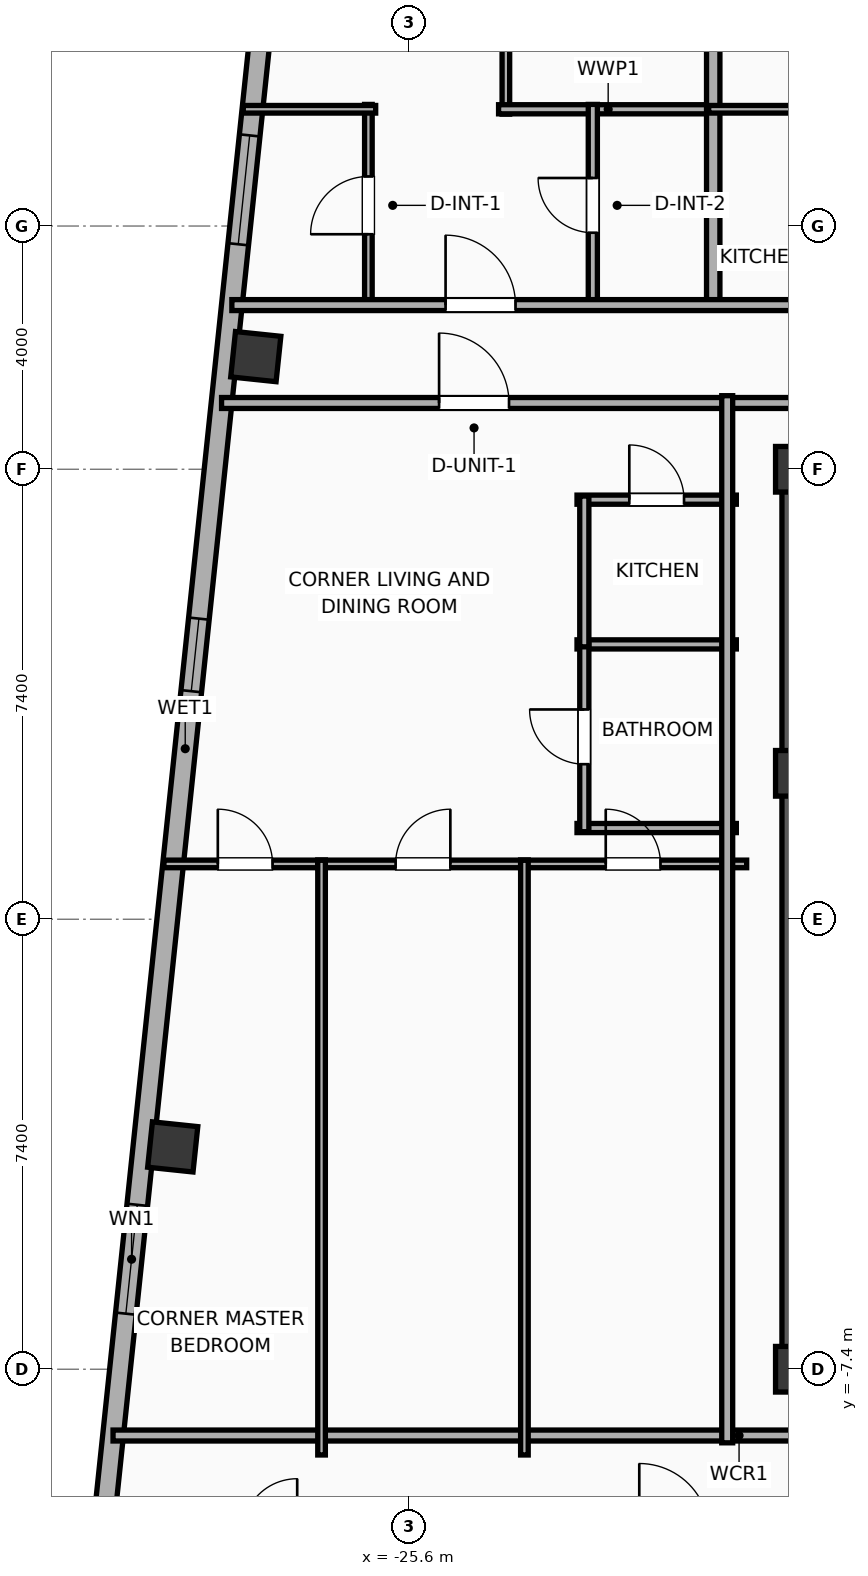
"""IFC4 building model, lengths in metres.
Left out: names, types, materials, properties, quantities, classifications, styles, units other than length and angle.
Written with IfcOpenShell. Run it as: python <this file> out.ifc"""

import sys

from ifc_helpers import new_model, si_unit, direction, frame, frame_2d, origin, origin_2d, place, context, subcontext, project, spatial, rectangle, hollow_rectangle, extrude, element, fill, save


model = new_model("IFC4")
c1 = context("Model", 3, precision=1e-05, world=origin(), true_north=direction((0.0, 1.0)))
c2 = subcontext(c1, "Body", "Model", "MODEL_VIEW")
j1 = project(units=[si_unit("LENGTHUNIT", "METRE"), si_unit("PLANEANGLEUNIT", "RADIAN")], contexts=[c1])
p1 = place(None, origin())
s1 = spatial("IfcSite", under=j1, at=p1, CompositionType="ELEMENT")
p2 = place(p1, origin())
s2 = spatial("IfcBuilding", under=s1, at=p2, CompositionType="ELEMENT")
p3 = place(p2, frame((0.0, 0.0, 260.0)))
s3 = spatial("IfcBuildingStorey", under=s2, at=p3, CompositionType="ELEMENT", Elevation=260.0)
for number, where, z_axis, x_axis in (
    (1, (-19.2, -7.4, 0.0), (0.0, 0.0, 1.0), (1.0, 0.0, 0.0)),
    (2, (-19.2, 2.4, 0.0), (0.0, 0.0, 1.0), (1.0, 0.0, 0.0)),
    (3, (-19.2, 7.4, 0.0), (0.0, 0.0, 1.0), (1.0, 0.0, 0.0)),
):
    element("IfcColumn", number, at=place(p3, frame(where, z_axis=z_axis, x_axis=x_axis)), inside=s3, PredefinedType="COLUMN", context=c2, shape_type="SweptSolid", body=[
        extrude(rectangle(XDim=0.75, YDim=0.75, at=origin_2d()), origin(), (0.0, 0.0, 1.0), 3.9),
    ])
for number, where, z_axis, x_axis in (
    (4, (-19.425, -7.4, 0.0), (0.0, 0.0, 1.0), (1.0, 0.0, 0.0)),
    (5, (-19.425, 7.4, 0.0), (0.0, 0.0, 1.0), (1.0, 0.0, 0.0)),
):
    element("IfcWall", number, at=place(p3, frame(where, z_axis=z_axis, x_axis=x_axis)), inside=s3, PredefinedType="SHEAR", context=c2, shape_type="SweptSolid", body=[
        extrude(rectangle(XDim=7.25, YDim=0.45, at=frame_2d((3.625, 0.0))), origin(), (0.0, 0.0, 1.0), 3.65),
    ])
p4 = place(p3, frame((-19.145, -7.4, 0.0), z_axis=(0.0, 0.0, 1.0), x_axis=(0.0, 1.0, 0.0)))
e6 = element("IfcWall", 6, at=p4, inside=s3, PredefinedType="SHEAR", context=c2, shape_type="SweptSolid", body=[
    extrude(rectangle(XDim=14.8, YDim=0.65, at=frame_2d((7.4, 0.0))), origin(), (0.0, 0.0, 1.0), 3.65),
])
for number, where, z_axis, x_axis in (
    (7, (-28.123, 9.252, 0.0), (0.0, 0.0, 1.0), (0.995, -0.105, 0.0)),
    (8, (-29.489, -3.744, 0.0), (0.0, 0.0, 1.0), (0.995, -0.105, 0.0)),
):
    element("IfcColumn", number, at=place(p3, frame(where, z_axis=z_axis, x_axis=x_axis)), inside=s3, PredefinedType="COLUMN", context=c2, shape_type="SweptSolid", body=[
        extrude(hollow_rectangle(XDim=0.75, YDim=0.75, WallThickness=0.025, at=origin_2d()), origin(), (0.0, 0.0, 1.0), 3.9),
    ])
p5 = place(p3, frame((-30.87, -12.296, 0.0), z_axis=(0.0, 0.0, 1.0), x_axis=(0.104533282919, 0.994521388791, 0.0)))
e9 = element("IfcWall", 9, at=p5, inside=s3, PredefinedType="ELEMENTEDWALL", context=c2, shape_type="SweptSolid", body=[
    extrude(rectangle(XDim=30.366, YDim=0.34, at=frame_2d((15.183, 0.0))), origin(), (0.0, 0.0, 1.0), 2.54),
])
p6 = place(p5, frame((5.842, 0.0, 0.75)))
e10 = element("IfcOpeningElement", 10, at=p6, cuts=e9, PredefinedType="OPENING", context=c2, shape_type="SweptSolid", body=[
    extrude(rectangle(XDim=1.8, YDim=1.63, at=frame_2d((0.9, 0.815))), frame((0.0, 0.18, 0.0), z_axis=(0.0, -1.0, 0.0), x_axis=(1.0, 0.0, 0.0)), (0.0, 0.0, 1.0), 0.36),
])
p7 = place(p5, frame((23.525, 0.0, 0.75)))
e11 = element("IfcOpeningElement", 11, at=p7, cuts=e9, PredefinedType="OPENING", context=c2, shape_type="SweptSolid", body=[
    extrude(rectangle(XDim=1.8, YDim=1.63, at=frame_2d((0.9, 0.815))), frame((0.0, 0.18, 0.0), z_axis=(0.0, -1.0, 0.0), x_axis=(1.0, 0.0, 0.0)), (0.0, 0.0, 1.0), 0.36),
])
p8 = place(p5, frame((27.017, 0.0, 0.75)))
e12 = element("IfcOpeningElement", 12, at=p8, cuts=e9, PredefinedType="OPENING", context=c2, shape_type="SweptSolid", body=[
    extrude(rectangle(XDim=1.2, YDim=1.63, at=frame_2d((0.6, 0.815))), frame((0.0, 0.18, 0.0), z_axis=(0.0, -1.0, 0.0), x_axis=(1.0, 0.0, 0.0)), (0.0, 0.0, 1.0), 0.36),
])
p9 = place(p5, frame((16.135, 0.0, 0.75)))
e13 = element("IfcOpeningElement", 13, at=p9, cuts=e9, PredefinedType="OPENING", context=c2, shape_type="SweptSolid", body=[
    extrude(rectangle(XDim=1.2, YDim=1.63, at=frame_2d((0.6, 0.815))), frame((0.0, 0.18, 0.0), z_axis=(0.0, -1.0, 0.0), x_axis=(1.0, 0.0, 0.0)), (0.0, 0.0, 1.0), 0.36),
])
p10 = place(p3, frame((-28.686, 8.49, 0.0), z_axis=(0.0, 0.0, 1.0), x_axis=(1.0, 0.0, 0.0)))
e14 = element("IfcWall", 14, at=p10, inside=s3, PredefinedType="PARTITIONING", context=c2, shape_type="SweptSolid", body=[
    extrude(rectangle(XDim=18.806, YDim=0.18, at=frame_2d((9.403, 0.0))), origin(), (0.0, 0.0, 1.0), 2.54),
])
p11 = place(p10, frame((3.577, 0.0, 0.0)))
e15 = element("IfcOpeningElement", 15, at=p11, cuts=e14, PredefinedType="OPENING", context=c2, shape_type="SweptSolid", body=[
    extrude(rectangle(XDim=1.15, YDim=2.05, at=frame_2d((0.575, 1.025))), frame((0.0, 0.1, 0.0), z_axis=(0.0, -1.0, 0.0), x_axis=(1.0, 0.0, 0.0)), (0.0, 0.0, 1.0), 0.2),
])
p12 = place(p3, frame((-30.47, -8.49, 0.0), z_axis=(0.0, 0.0, 1.0), x_axis=(1.0, 0.0, 0.0)))
e16 = element("IfcWall", 16, at=p12, inside=s3, PredefinedType="PARTITIONING", context=c2, shape_type="SweptSolid", body=[
    extrude(rectangle(XDim=20.59, YDim=0.18, at=frame_2d((10.295, 0.0))), origin(), (0.0, 0.0, 1.0), 3.65),
])
p13 = place(p3, frame((-24.01, 13.24, 0.0), z_axis=(0.0, 0.0, 1.0), x_axis=(0.0, 1.0, 0.0)))
e17 = element("IfcWall", 17, at=p13, inside=s3, PredefinedType="PARTITIONING", context=c2, shape_type="SweptSolid", body=[
    extrude(rectangle(XDim=7.873, YDim=0.125, at=frame_2d((3.937, 0.0))), origin(), (0.0, 0.0, 1.0), 2.54),
])
p14 = place(p13, frame((1.44, 0.0, 0.0)))
e18 = element("IfcOpeningElement", 18, at=p14, cuts=e17, PredefinedType="OPENING", context=c2, shape_type="SweptSolid", body=[
    extrude(rectangle(XDim=0.9, YDim=2.05, at=frame_2d((0.45, 1.025))), frame((0.0, 0.073, 0.0), z_axis=(0.0, -1.0, 0.0), x_axis=(1.0, 0.0, 0.0)), (0.0, 0.0, 1.0), 0.145),
])
p15 = place(p3, frame((-24.13, 13.32, 0.0), z_axis=(0.0, 0.0, 1.0), x_axis=(1.0, 0.0, 0.0)))
e19 = element("IfcWall", 19, at=p15, inside=s3, PredefinedType="PLUMBINGWALL", context=c2, shape_type="SweptSolid", body=[
    extrude(rectangle(XDim=3.605, YDim=0.15, at=frame_2d((1.802, 0.0))), origin(), (0.0, 0.0, 1.0), 3.65),
])
p16 = place(p3, frame((-26.271, 10.08, 0.0), z_axis=(0.0, 0.0, 1.0), x_axis=(0.0, 1.0, 0.0)))
e20 = element("IfcWall", 20, at=p16, inside=s3, PredefinedType="PARTITIONING", context=c2, shape_type="SweptSolid", body=[
    extrude(rectangle(XDim=3.32, YDim=0.125, at=frame_2d((1.66, 0.0))), origin(), (0.0, 0.0, 1.0), 3.65),
])
p17 = place(p16, frame((1.185, 0.0, 0.0)))
e21 = element("IfcOpeningElement", 21, at=p17, cuts=e20, PredefinedType="OPENING", context=c2, shape_type="SweptSolid", body=[
    extrude(rectangle(XDim=0.95, YDim=2.05, at=frame_2d((0.475, 1.025))), frame((0.0, 0.073, 0.0), z_axis=(0.0, -1.0, 0.0), x_axis=(1.0, 0.0, 0.0)), (0.0, 0.0, 1.0), 0.145),
])
p18 = place(p3, frame((-28.329, 13.32, 0.0), z_axis=(0.0, 0.0, 1.0), x_axis=(1.0, 0.0, 0.0)))
e22 = element("IfcWall", 22, at=p18, inside=s3, PredefinedType="PARTITIONING", context=c2, shape_type="SweptSolid", body=[
    extrude(rectangle(XDim=2.178, YDim=0.125, at=frame_2d((1.089, 0.0))), origin(), (0.0, 0.0, 1.0), 3.65),
])
p19 = place(p3, frame((-22.58, 10.08, 0.0), z_axis=(0.0, 0.0, 1.0), x_axis=(0.0, 1.0, 0.0)))
e23 = element("IfcWall", 23, at=p19, inside=s3, PredefinedType="PLUMBINGWALL", context=c2, shape_type="SweptSolid", body=[
    extrude(rectangle(XDim=3.32, YDim=0.15, at=frame_2d((1.66, 0.0))), origin(), (0.0, 0.0, 1.0), 3.65),
])
p20 = place(p19, frame((1.21, 0.0, 0.0)))
e24 = element("IfcOpeningElement", 24, at=p20, cuts=e23, PredefinedType="OPENING", context=c2, shape_type="SweptSolid", body=[
    extrude(rectangle(XDim=0.9, YDim=2.05, at=frame_2d((0.45, 1.025))), frame((0.0, 0.085, 0.0), z_axis=(0.0, -1.0, 0.0), x_axis=(1.0, 0.0, 0.0)), (0.0, 0.0, 1.0), 0.17),
])
p21 = place(p3, frame((-20.6, 10.02, 0.0), z_axis=(0.0, 0.0, 1.0), x_axis=(0.0, 1.0, 0.0)))
e25 = element("IfcWall", 25, at=p21, inside=s3, PredefinedType="PARTITIONING", context=c2, shape_type="SweptSolid", body=[
    extrude(rectangle(XDim=10.604, YDim=0.22, at=frame_2d((5.302, 0.0))), origin(), (0.0, 0.0, 1.0), 2.54),
])
p22 = place(p3, frame((-20.675, 13.32, 0.0), z_axis=(0.0, 0.0, 1.0), x_axis=(1.0, 0.0, 0.0)))
e26 = element("IfcWall", 26, at=p22, inside=s3, PredefinedType="PARTITIONING", context=c2, shape_type="SweptSolid", body=[
    extrude(rectangle(XDim=2.505, YDim=0.125, at=frame_2d((1.252, 0.0))), origin(), (0.0, 0.0, 1.0), 3.65),
])
p23 = place(p3, frame((-28.516, 10.1, 0.0), z_axis=(0.0, 0.0, 1.0), x_axis=(1.0, 0.0, 0.0)))
e27 = element("IfcWall", 27, at=p23, inside=s3, PredefinedType="PARTITIONING", context=c2, shape_type="SweptSolid", body=[
    extrude(rectangle(XDim=53.955, YDim=0.18, at=frame_2d((26.978, 0.0))), origin(), (0.0, 0.0, 1.0), 3.65),
])
p24 = place(p23, frame((3.515, 0.0, 0.0)))
e28 = element("IfcOpeningElement", 28, at=p24, cuts=e27, PredefinedType="OPENING", context=c2, shape_type="SweptSolid", body=[
    extrude(rectangle(XDim=1.15, YDim=2.05, at=frame_2d((0.575, 1.025))), frame((0.0, 0.1, 0.0), z_axis=(0.0, -1.0, 0.0), x_axis=(1.0, 0.0, 0.0)), (0.0, 0.0, 1.0), 0.2),
])
p25 = place(p23, frame((11.408, 0.0, 0.0)))
e29 = element("IfcOpeningElement", 29, at=p25, cuts=e27, PredefinedType="OPENING", context=c2, shape_type="SweptSolid", body=[
    extrude(rectangle(XDim=1.15, YDim=2.05, at=frame_2d((0.575, 1.025))), frame((0.0, 0.1, 0.0), z_axis=(0.0, -1.0, 0.0), x_axis=(1.0, 0.0, 0.0)), (0.0, 0.0, 1.0), 0.2),
])
p26 = place(p23, frame((19.205, 0.0, 0.0)))
e30 = element("IfcOpeningElement", 30, at=p26, cuts=e27, PredefinedType="OPENING", context=c2, shape_type="SweptSolid", body=[
    extrude(rectangle(XDim=1.15, YDim=2.05, at=frame_2d((0.575, 1.025))), frame((0.0, 0.1, 0.0), z_axis=(0.0, -1.0, 0.0), x_axis=(1.0, 0.0, 0.0)), (0.0, 0.0, 1.0), 0.2),
])
p27 = place(p23, frame((27.159, 0.0, 0.0)))
e31 = element("IfcOpeningElement", 31, at=p27, cuts=e27, PredefinedType="OPENING", context=c2, shape_type="SweptSolid", body=[
    extrude(rectangle(XDim=0.9, YDim=2.05, at=frame_2d((0.45, 1.025))), frame((0.0, 0.1, 0.0), z_axis=(0.0, -1.0, 0.0), x_axis=(1.0, 0.0, 0.0)), (0.0, 0.0, 1.0), 0.2),
])
p28 = place(p23, frame((34.642, 0.0, 0.0)))
e32 = element("IfcOpeningElement", 32, at=p28, cuts=e27, PredefinedType="OPENING", context=c2, shape_type="SweptSolid", body=[
    extrude(rectangle(XDim=1.15, YDim=2.05, at=frame_2d((0.575, 1.025))), frame((0.0, 0.1, 0.0), z_axis=(0.0, -1.0, 0.0), x_axis=(1.0, 0.0, 0.0)), (0.0, 0.0, 1.0), 0.2),
])
p29 = place(p23, frame((42.606, 0.0, 0.0)))
e33 = element("IfcOpeningElement", 33, at=p29, cuts=e27, PredefinedType="OPENING", context=c2, shape_type="SweptSolid", body=[
    extrude(rectangle(XDim=1.15, YDim=2.05, at=frame_2d((0.575, 1.025))), frame((0.0, 0.1, 0.0), z_axis=(0.0, -1.0, 0.0), x_axis=(1.0, 0.0, 0.0)), (0.0, 0.0, 1.0), 0.2),
])
p30 = place(p23, frame((50.279, 0.0, 0.0)))
e34 = element("IfcOpeningElement", 34, at=p30, cuts=e27, PredefinedType="OPENING", context=c2, shape_type="SweptSolid", body=[
    extrude(rectangle(XDim=0.9, YDim=2.05, at=frame_2d((0.45, 1.025))), frame((0.0, 0.1, 0.0), z_axis=(0.0, -1.0, 0.0), x_axis=(1.0, 0.0, 0.0)), (0.0, 0.0, 1.0), 0.2),
])
p31 = place(p3, frame((-22.84, 6.9, 0.0), z_axis=(0.0, 0.0, 1.0), x_axis=(1.0, 0.0, 0.0)))
e35 = element("IfcWall", 35, at=p31, inside=s3, PredefinedType="PLUMBINGWALL", context=c2, shape_type="SweptSolid", body=[
    extrude(rectangle(XDim=2.62, YDim=0.15, at=frame_2d((1.31, 0.0))), origin(), (0.0, 0.0, 1.0), 3.65),
])
p32 = place(p31, frame((0.86, 0.0, 0.0)))
e36 = element("IfcOpeningElement", 36, at=p32, cuts=e35, PredefinedType="OPENING", context=c2, shape_type="SweptSolid", body=[
    extrude(rectangle(XDim=0.9, YDim=2.05, at=frame_2d((0.45, 1.025))), frame((0.0, 0.085, 0.0), z_axis=(0.0, -1.0, 0.0), x_axis=(1.0, 0.0, 0.0)), (0.0, 0.0, 1.0), 0.17),
])
for number, where, z_axis, x_axis in (
    (37, (-22.84, 4.52, 0.0), (0.0, 0.0, 1.0), (1.0, 0.0, 0.0)),
    (38, (-22.84, 1.5, 0.0), (0.0, 0.0, 1.0), (1.0, 0.0, 0.0)),
):
    element("IfcWall", number, at=place(p3, frame(where, z_axis=z_axis, x_axis=x_axis)), inside=s3, PredefinedType="PLUMBINGWALL", context=c2, shape_type="SweptSolid", body=[
        extrude(rectangle(XDim=2.62, YDim=0.15, at=frame_2d((1.31, 0.0))), origin(), (0.0, 0.0, 1.0), 3.65),
    ])
p33 = place(p3, frame((-22.72, 1.44, 0.0), z_axis=(0.0, 0.0, 1.0), x_axis=(0.0, 1.0, 0.0)))
e39 = element("IfcWall", 39, at=p33, inside=s3, PredefinedType="PLUMBINGWALL", context=c2, shape_type="SweptSolid", body=[
    extrude(rectangle(XDim=3.12, YDim=0.15, at=frame_2d((1.56, 0.0))), origin(), (0.0, 0.0, 1.0), 3.65),
])
p34 = place(p33, frame((1.11, 0.0, 0.0)))
e40 = element("IfcOpeningElement", 40, at=p34, cuts=e39, PredefinedType="OPENING", context=c2, shape_type="SweptSolid", body=[
    extrude(rectangle(XDim=0.9, YDim=2.05, at=frame_2d((0.45, 1.025))), frame((0.0, 0.085, 0.0), z_axis=(0.0, -1.0, 0.0), x_axis=(1.0, 0.0, 0.0)), (0.0, 0.0, 1.0), 0.17),
])
p35 = place(p3, frame((-22.72, 4.48, 0.0), z_axis=(0.0, 0.0, 1.0), x_axis=(0.0, 1.0, 0.0)))
e41 = element("IfcWall", 41, at=p35, inside=s3, PredefinedType="PLUMBINGWALL", context=c2, shape_type="SweptSolid", body=[
    extrude(rectangle(XDim=2.48, YDim=0.15, at=frame_2d((1.24, 0.0))), origin(), (0.0, 0.0, 1.0), 3.65),
])
p36 = place(p3, frame((-29.633, 0.91, 0.0), z_axis=(0.0, 0.0, 1.0), x_axis=(1.0, 0.0, 0.0)))
e42 = element("IfcWall", 42, at=p36, inside=s3, PredefinedType="PARTITIONING", context=c2, shape_type="SweptSolid", body=[
    extrude(rectangle(XDim=2.655, YDim=0.125, at=frame_2d((1.327, 0.0))), origin(), (0.0, 0.0, 1.0), 3.65),
])
p37 = place(p36, frame((0.886, 0.0, 0.0)))
e43 = element("IfcOpeningElement", 43, at=p37, cuts=e42, PredefinedType="OPENING", context=c2, shape_type="SweptSolid", body=[
    extrude(rectangle(XDim=0.9, YDim=2.05, at=frame_2d((0.45, 1.025))), frame((0.0, 0.073, 0.0), z_axis=(0.0, -1.0, 0.0), x_axis=(1.0, 0.0, 0.0)), (0.0, 0.0, 1.0), 0.145),
])
p38 = place(p3, frame((-27.104, 0.91, 0.0), z_axis=(0.0, 0.0, 1.0), x_axis=(1.0, 0.0, 0.0)))
e44 = element("IfcWall", 44, at=p38, inside=s3, PredefinedType="PARTITIONING", context=c2, shape_type="SweptSolid", body=[
    extrude(rectangle(XDim=3.461, YDim=0.125, at=frame_2d((1.73, 0.0))), origin(), (0.0, 0.0, 1.0), 3.65),
])
p39 = place(p38, frame((1.281, 0.0, 0.0)))
e45 = element("IfcOpeningElement", 45, at=p39, cuts=e44, PredefinedType="OPENING", context=c2, shape_type="SweptSolid", body=[
    extrude(rectangle(XDim=0.9, YDim=2.05, at=frame_2d((0.45, 1.025))), frame((0.0, 0.073, 0.0), z_axis=(0.0, -1.0, 0.0), x_axis=(1.0, 0.0, 0.0)), (0.0, 0.0, 1.0), 0.145),
])
p40 = place(p3, frame((-23.768, 0.91, 0.0), z_axis=(0.0, 0.0, 1.0), x_axis=(1.0, 0.0, 0.0)))
e46 = element("IfcWall", 46, at=p40, inside=s3, PredefinedType="PARTITIONING", context=c2, shape_type="SweptSolid", body=[
    extrude(rectangle(XDim=3.718, YDim=0.125, at=frame_2d((1.859, 0.0))), origin(), (0.0, 0.0, 1.0), 3.65),
])
p41 = place(p40, frame((1.4, 0.0, 0.0)))
e47 = element("IfcOpeningElement", 47, at=p41, cuts=e46, PredefinedType="OPENING", context=c2, shape_type="SweptSolid", body=[
    extrude(rectangle(XDim=0.9, YDim=2.05, at=frame_2d((0.45, 1.025))), frame((0.0, 0.073, 0.0), z_axis=(0.0, -1.0, 0.0), x_axis=(1.0, 0.0, 0.0)), (0.0, 0.0, 1.0), 0.145),
])
for number, where, z_axis, x_axis in (
    (48, (-23.705, -8.81, 0.0), (0.0, 0.0, 1.0), (0.0, 1.0, 0.0)),
    (49, (-27.041, -8.81, 0.0), (0.0, 0.0, 1.0), (0.0, 1.0, 0.0)),
):
    element("IfcWall", number, at=place(p3, frame(where, z_axis=z_axis, x_axis=x_axis)), inside=s3, PredefinedType="PARTITIONING", context=c2, shape_type="SweptSolid", body=[
        extrude(rectangle(XDim=9.78, YDim=0.125, at=frame_2d((4.89, 0.0))), origin(), (0.0, 0.0, 1.0), 3.65),
    ])
p42 = place(p3, frame((-20.37, -8.61, 0.0), z_axis=(0.0, 0.0, 1.0), x_axis=(0.0, 1.0, 0.0)))
e50 = element("IfcWall", 50, at=p42, inside=s3, PredefinedType="PARTITIONING", context=c2, shape_type="SweptSolid", body=[
    extrude(rectangle(XDim=17.22, YDim=0.18, at=frame_2d((8.61, 0.0))), origin(), (0.0, 0.0, 1.0), 3.65),
])
p43 = place(p6, origin())
e51 = element("IfcWindow", 51, at=p43, inside=s3, PartitioningType="SINGLE_PANEL", PredefinedType="WINDOW", context=c2, shape_type="SweptSolid", body=[
    extrude(rectangle(XDim=1.8, YDim=1.63, at=frame_2d((0.9, 0.815))), frame((0.0, 0.03, 0.0), z_axis=(0.0, -1.0, 0.0), x_axis=(1.0, 0.0, 0.0)), (0.0, 0.0, 1.0), 0.06),
])
fill(e10, e51)
p44 = place(p7, origin())
e52 = element("IfcWindow", 52, at=p44, inside=s3, PartitioningType="SINGLE_PANEL", PredefinedType="WINDOW", context=c2, shape_type="SweptSolid", body=[
    extrude(rectangle(XDim=1.8, YDim=1.63, at=frame_2d((0.9, 0.815))), frame((0.0, 0.03, 0.0), z_axis=(0.0, -1.0, 0.0), x_axis=(1.0, 0.0, 0.0)), (0.0, 0.0, 1.0), 0.06),
])
fill(e11, e52)
p45 = place(p9, origin())
e53 = element("IfcWindow", 53, at=p45, inside=s3, PartitioningType="SINGLE_PANEL", PredefinedType="WINDOW", context=c2, shape_type="SweptSolid", body=[
    extrude(rectangle(XDim=1.2, YDim=1.63, at=frame_2d((0.6, 0.815))), frame((0.0, 0.03, 0.0), z_axis=(0.0, -1.0, 0.0), x_axis=(1.0, 0.0, 0.0)), (0.0, 0.0, 1.0), 0.06),
])
fill(e13, e53)
p46 = place(p11, origin())
e54 = element("IfcDoor", 54, at=p46, inside=s3, OperationType="SINGLE_SWING_LEFT", PredefinedType="DOOR", context=c2, shape_type="SweptSolid", body=[
    extrude(rectangle(XDim=1.15, YDim=2.05, at=frame_2d((0.575, 1.025))), frame((0.0, 0.025, 0.0), z_axis=(0.0, -1.0, 0.0), x_axis=(1.0, 0.0, 0.0)), (0.0, 0.0, 1.0), 0.05),
])
fill(e15, e54)
p47 = place(p17, origin())
e55 = element("IfcDoor", 55, at=p47, inside=s3, OperationType="SINGLE_SWING_LEFT", PredefinedType="DOOR", context=c2, shape_type="SweptSolid", body=[
    extrude(rectangle(XDim=0.95, YDim=2.05, at=frame_2d((0.475, 1.025))), frame((0.0, 0.025, 0.0), z_axis=(0.0, -1.0, 0.0), x_axis=(1.0, 0.0, 0.0)), (0.0, 0.0, 1.0), 0.05),
])
fill(e21, e55)
p48 = place(p20, origin())
e56 = element("IfcDoor", 56, at=p48, inside=s3, OperationType="SINGLE_SWING_RIGHT", PredefinedType="DOOR", context=c2, shape_type="SweptSolid", body=[
    extrude(rectangle(XDim=0.9, YDim=2.05, at=frame_2d((0.45, 1.025))), frame((0.0, 0.025, 0.0), z_axis=(0.0, -1.0, 0.0), x_axis=(1.0, 0.0, 0.0)), (0.0, 0.0, 1.0), 0.05),
])
fill(e24, e56)
p49 = place(p24, origin())
e57 = element("IfcDoor", 57, at=p49, inside=s3, OperationType="SINGLE_SWING_LEFT", PredefinedType="DOOR", context=c2, shape_type="SweptSolid", body=[
    extrude(rectangle(XDim=1.15, YDim=2.05, at=frame_2d((0.575, 1.025))), frame((0.0, 0.025, 0.0), z_axis=(0.0, -1.0, 0.0), x_axis=(1.0, 0.0, 0.0)), (0.0, 0.0, 1.0), 0.05),
])
fill(e28, e57)
p50 = place(p32, origin())
e58 = element("IfcDoor", 58, at=p50, inside=s3, OperationType="SINGLE_SWING_LEFT", PredefinedType="DOOR", context=c2, shape_type="SweptSolid", body=[
    extrude(rectangle(XDim=0.9, YDim=2.05, at=frame_2d((0.45, 1.025))), frame((0.0, 0.025, 0.0), z_axis=(0.0, -1.0, 0.0), x_axis=(1.0, 0.0, 0.0)), (0.0, 0.0, 1.0), 0.05),
])
fill(e36, e58)
p51 = place(p34, origin())
e59 = element("IfcDoor", 59, at=p51, inside=s3, OperationType="SINGLE_SWING_RIGHT", PredefinedType="DOOR", context=c2, shape_type="SweptSolid", body=[
    extrude(rectangle(XDim=0.9, YDim=2.05, at=frame_2d((0.45, 1.025))), frame((0.0, 0.025, 0.0), z_axis=(0.0, -1.0, 0.0), x_axis=(1.0, 0.0, 0.0)), (0.0, 0.0, 1.0), 0.05),
])
fill(e40, e59)
p52 = place(p37, origin())
e60 = element("IfcDoor", 60, at=p52, inside=s3, OperationType="SINGLE_SWING_LEFT", PredefinedType="DOOR", context=c2, shape_type="SweptSolid", body=[
    extrude(rectangle(XDim=0.9, YDim=2.05, at=frame_2d((0.45, 1.025))), frame((0.0, 0.025, 0.0), z_axis=(0.0, -1.0, 0.0), x_axis=(1.0, 0.0, 0.0)), (0.0, 0.0, 1.0), 0.05),
])
fill(e43, e60)
p53 = place(p39, origin())
e61 = element("IfcDoor", 61, at=p53, inside=s3, OperationType="SINGLE_SWING_RIGHT", PredefinedType="DOOR", context=c2, shape_type="SweptSolid", body=[
    extrude(rectangle(XDim=0.9, YDim=2.05, at=frame_2d((0.45, 1.025))), frame((0.0, 0.025, 0.0), z_axis=(0.0, -1.0, 0.0), x_axis=(1.0, 0.0, 0.0)), (0.0, 0.0, 1.0), 0.05),
])
fill(e45, e61)
p54 = place(p41, origin())
e62 = element("IfcDoor", 62, at=p54, inside=s3, OperationType="SINGLE_SWING_LEFT", PredefinedType="DOOR", context=c2, shape_type="SweptSolid", body=[
    extrude(rectangle(XDim=0.9, YDim=2.05, at=frame_2d((0.45, 1.025))), frame((0.0, 0.025, 0.0), z_axis=(0.0, -1.0, 0.0), x_axis=(1.0, 0.0, 0.0)), (0.0, 0.0, 1.0), 0.05),
])
fill(e47, e62)
save(model, sys.argv[1])
